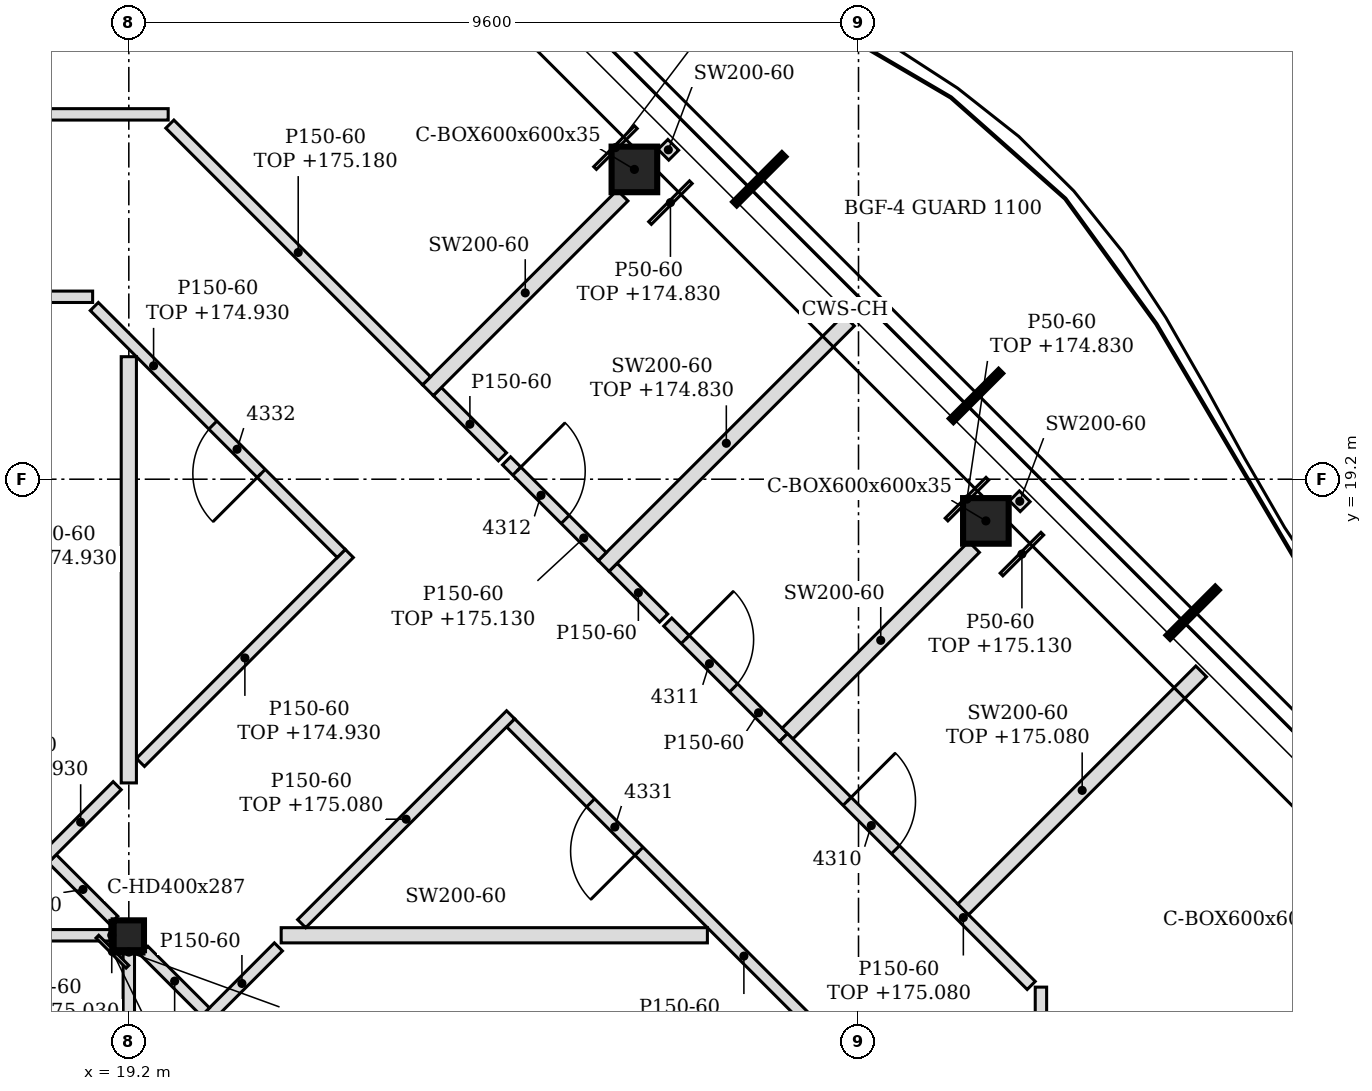
"""IFC4 building model, lengths in metres.
Left out: names, types, materials, properties, quantities, classifications, styles, units other than length and angle.
Written with IfcOpenShell. Run it as: python <this file> out.ifc"""

import sys

from ifc_helpers import new_model, si_unit, direction, frame, frame_2d, origin, origin_2d, place, context, subcontext, project, spatial, polyline, rectangle, hollow_rectangle, i_section, outline, extrude, clip, halfspace, element, fill, save


model = new_model("IFC4")
c1 = context("Model", 3, precision=1e-05, world=origin(), true_north=direction((0.0, 1.0)))
c2 = subcontext(c1, "Body", "Model", "MODEL_VIEW")
j1 = project(units=[si_unit("LENGTHUNIT", "METRE"), si_unit("PLANEANGLEUNIT", "RADIAN")], contexts=[c1])
p1 = place(None, origin())
s1 = spatial("IfcSite", under=j1, at=p1, CompositionType="ELEMENT")
p2 = place(p1, origin())
s2 = spatial("IfcBuilding", under=s1, at=p2, CompositionType="ELEMENT")
p3 = place(p2, frame((0.0, 0.0, 172.2)))
s3 = spatial("IfcBuildingStorey", under=s2, at=p3, CompositionType="ELEMENT", Elevation=172.2)
p4 = place(p3, frame((30.476, 18.652, -0.15), z_axis=(0.062353782033, -0.041591730966, 0.997187110718), x_axis=(0.554908399644, 0.831911454426, 0.0)))
e1 = element("IfcColumn", 1, at=p4, inside=s3, PredefinedType="COLUMN", context=c2, shape_type="Clipping", body=[
    clip(clip(extrude(hollow_rectangle(XDim=0.6, YDim=0.6, WallThickness=0.035, at=origin_2d()), origin(), (0.0, 0.0, 1.0), 3.61), halfspace(frame((0.0, 0.0, 0.011), z_axis=(0.0, 0.0, 1.0), x_axis=(1.0, 0.0, 0.0)), True)), halfspace(frame((0.0, 0.0, 3.588), z_axis=(0.0, 0.0, 1.0), x_axis=(1.0, 0.0, 0.0)), False)),
])
p5 = place(p3, frame((25.852, 23.276, -0.15), z_axis=(0.062286590776, -0.041524393851, 0.99719411617), x_axis=(0.554700196225, 0.832050294338, 0.0)))
e2 = element("IfcColumn", 2, at=p5, inside=s3, PredefinedType="COLUMN", context=c2, shape_type="Clipping", body=[
    clip(clip(extrude(hollow_rectangle(XDim=0.6, YDim=0.6, WallThickness=0.035, at=origin_2d()), origin(), (0.0, 0.0, 1.0), 3.61), halfspace(frame((0.0, 0.0, 0.011), z_axis=(0.0, 0.0, 1.0), x_axis=(1.0, 0.0, 0.0)), True)), halfspace(frame((0.0, 0.0, 3.588), z_axis=(0.0, 0.0, 1.0), x_axis=(1.0, 0.0, 0.0)), False)),
])
p6 = place(p3, frame((19.2, 13.2, -0.15), z_axis=(0.0, 0.0, 1.0), x_axis=(1.0, 0.0, 0.0)))
e3 = element("IfcColumn", 3, at=p6, inside=s3, PredefinedType="COLUMN", context=c2, shape_type="SweptSolid", body=[
    extrude(i_section(OverallWidth=0.399, OverallDepth=0.393, WebThickness=0.023, FlangeThickness=0.037, FilletRadius=0.015, at=origin_2d()), origin(), (0.0, 0.0, 1.0), 3.6),
])
p7 = place(p3, frame((19.2, 2.596, 0.0), z_axis=(0.0, 0.0, 1.0), x_axis=(0.0, 1.0, 0.0)))
e4 = element("IfcWall", 4, at=p7, inside=s3, PredefinedType="PARTITIONING", context=c2, shape_type="SweptSolid", body=[
    extrude(rectangle(XDim=10.407, YDim=0.15, at=frame_2d((5.204, 0.0))), origin(), (0.0, 0.0, 1.0), 2.83),
])
p8 = place(p7, frame((2.954, 0.0, 0.0)))
e5 = element("IfcOpeningElement", 5, at=p8, cuts=e4, PredefinedType="OPENING", context=c2, shape_type="SweptSolid", body=[
    extrude(rectangle(XDim=0.9, YDim=2.1, at=frame_2d((0.45, 1.05))), frame((0.0, 0.085, 0.0), z_axis=(0.0, -1.0, 0.0), x_axis=(1.0, 0.0, 0.0)), (0.0, 0.0, 1.0), 0.17),
])
p9 = place(p3, frame((31.2, 9.812, 0.0), z_axis=(0.0, 0.0, 1.0), x_axis=(0.0, 1.0, 0.0)))
e6 = element("IfcWall", 6, at=p9, inside=s3, PredefinedType="PARTITIONING", context=c2, shape_type="SweptSolid", body=[
    extrude(rectangle(XDim=2.706, YDim=0.15, at=frame_2d((1.353, 0.0))), origin(), (0.0, 0.0, 1.0), 2.93),
])
p10 = place(p9, frame((0.507, 0.0, 0.0)))
e7 = element("IfcOpeningElement", 7, at=p10, cuts=e6, PredefinedType="OPENING", context=c2, shape_type="SweptSolid", body=[
    extrude(rectangle(XDim=0.9, YDim=2.1, at=frame_2d((0.45, 1.05))), frame((0.0, 0.085, 0.0), z_axis=(0.0, -1.0, 0.0), x_axis=(1.0, 0.0, 0.0)), (0.0, 0.0, 1.0), 0.17),
])
p11 = place(p3, frame((28.672, 11.546, 0.0), z_axis=(0.0, 0.0, 1.0), x_axis=(-0.707106781187, 0.707106781187, 0.0)))
e8 = element("IfcWall", 8, at=p11, inside=s3, PredefinedType="PARTITIONING", context=c2, shape_type="SweptSolid", body=[
    extrude(rectangle(XDim=6.292, YDim=0.15, at=frame_2d((3.146, 0.0))), origin(), (0.0, 0.0, 1.0), 2.88),
])
p12 = place(p11, frame((3.903, 0.0, 0.0)))
e9 = element("IfcOpeningElement", 9, at=p12, cuts=e8, PredefinedType="OPENING", context=c2, shape_type="SweptSolid", body=[
    extrude(rectangle(XDim=0.9, YDim=2.1, at=frame_2d((0.45, 1.05))), frame((0.0, 0.085, 0.0), z_axis=(0.0, -1.0, 0.0), x_axis=(1.0, 0.0, 0.0)), (0.0, 0.0, 1.0), 0.17),
])
p13 = place(p3, frame((20.208, 12.086, 0.0), z_axis=(0.0, 0.0, 1.0), x_axis=(0.706747296365, 0.707466083343, 0.0)))
e10 = element("IfcWall", 10, at=p13, inside=s3, PredefinedType="PARTITIONING", context=c2, shape_type="SweptSolid", body=[
    extrude(rectangle(XDim=1.359, YDim=0.15, at=frame_2d((0.679, 0.0))), origin(), (0.0, 0.0, 1.0), 3.45),
])
p14 = place(p3, frame((20.208, 12.192, 0.0), z_axis=(0.0, 0.0, 1.0), x_axis=(-0.70721334539, 0.707000200921, 0.0)))
e11 = element("IfcWall", 11, at=p14, inside=s3, PredefinedType="PARTITIONING", context=c2, shape_type="SweptSolid", body=[
    extrude(rectangle(XDim=1.146, YDim=0.15, at=frame_2d((0.573, 0.0))), origin(), (0.0, 0.0, 1.0), 3.45),
])
p15 = place(p3, frame((31.072, 12.54, 0.0), z_axis=(0.0, 0.0, 1.0), x_axis=(-0.707106781187, 0.707106781187, 0.0)))
e12 = element("IfcWall", 12, at=p15, inside=s3, PredefinedType="PARTITIONING", context=c2, shape_type="SweptSolid", body=[
    extrude(rectangle(XDim=4.61, YDim=0.15, at=frame_2d((2.305, 0.0))), origin(), (0.0, 0.0, 1.0), 2.88),
])
p16 = place(p15, frame((2.525, 0.0, 0.0)))
e13 = element("IfcOpeningElement", 13, at=p16, cuts=e12, PredefinedType="OPENING", context=c2, shape_type="SweptSolid", body=[
    extrude(rectangle(XDim=0.9, YDim=2.1, at=frame_2d((0.45, 1.05))), frame((0.0, 0.085, 0.0), z_axis=(0.0, -1.0, 0.0), x_axis=(1.0, 0.0, 0.0)), (0.0, 0.0, 1.0), 0.17),
])
p17 = place(p3, frame((7.399, 13.2, 0.0), z_axis=(0.0, 0.0, 1.0), x_axis=(1.0, 0.0, 0.0)))
e14 = element("IfcWall", 14, at=p17, inside=s3, PredefinedType="PARTITIONING", context=c2, shape_type="SweptSolid", body=[
    extrude(rectangle(XDim=11.601, YDim=0.15, at=frame_2d((5.801, 0.0))), origin(), (0.0, 0.0, 1.0), 2.83),
])
p18 = place(p17, frame((5.351, 0.0, 0.0)))
e15 = element("IfcOpeningElement", 15, at=p18, cuts=e14, PredefinedType="OPENING", context=c2, shape_type="SweptSolid", body=[
    extrude(rectangle(XDim=0.9, YDim=2.1, at=frame_2d((0.45, 1.05))), frame((0.0, 0.085, 0.0), z_axis=(0.0, -1.0, 0.0), x_axis=(1.0, 0.0, 0.0)), (0.0, 0.0, 1.0), 0.17),
])
p19 = place(p3, frame((21.205, 13.2, 0.0), z_axis=(0.0, 0.0, 1.0), x_axis=(1.0, 0.0, 0.0)))
e16 = element("IfcWall", 16, at=p19, inside=s3, PredefinedType="PARTITIONING", context=c2, shape_type="SweptSolid", body=[
    extrude(rectangle(XDim=5.607, YDim=0.2, at=frame_2d((2.804, 0.0))), origin(), (0.0, 0.0, 1.0), 3.45),
])
p20 = place(p3, frame((19.002, 13.398, 0.0), z_axis=(0.0, 0.0, 1.0), x_axis=(-0.707000200921, 0.70721334539, 0.0)))
e17 = element("IfcWall", 17, at=p20, inside=s3, PredefinedType="PARTITIONING", context=c2, shape_type="SweptSolid", body=[
    extrude(rectangle(XDim=1.146, YDim=0.15, at=frame_2d((0.573, 0.0))), origin(), (0.0, 0.0, 1.0), 3.45),
])
p21 = place(p3, frame((21.474, 13.353, 0.0), z_axis=(0.0, 0.0, 1.0), x_axis=(0.707200993001, 0.707012556818, 0.0)))
e18 = element("IfcWall", 18, at=p21, inside=s3, PredefinedType="PARTITIONING", context=c2, shape_type="SweptSolid", body=[
    extrude(rectangle(XDim=3.887, YDim=0.15, at=frame_2d((1.943, 0.0))), origin(), (0.0, 0.0, 1.0), 2.88),
])
p22 = place(p3, frame((30.177, 13.541, 0.0), z_axis=(0.0, 0.0, 1.0), x_axis=(0.707106781187, 0.707106781187, 0.0)))
e19 = element("IfcWall", 19, at=p22, inside=s3, PredefinedType="PARTITIONING", context=c2, shape_type="SweptSolid", body=[
    extrude(rectangle(XDim=4.428, YDim=0.2, at=frame_2d((2.214, 0.0))), origin(), (0.0, 0.0, 1.0), 2.88),
])
p23 = place(p3, frame((18.086, 14.208, 0.0), z_axis=(0.0, 0.0, 1.0), x_axis=(0.707466083343, 0.706747296365, 0.0)))
e20 = element("IfcWall", 20, at=p23, inside=s3, PredefinedType="PARTITIONING", context=c2, shape_type="SweptSolid", body=[
    extrude(rectangle(XDim=1.359, YDim=0.15, at=frame_2d((0.679, 0.0))), origin(), (0.0, 0.0, 1.0), 2.73),
])
p24 = place(p3, frame((19.2, 15.205, 0.0), z_axis=(0.0, 0.0, 1.0), x_axis=(0.0, 1.0, 0.0)))
e21 = element("IfcWall", 21, at=p24, inside=s3, PredefinedType="PARTITIONING", context=c2, shape_type="SweptSolid", body=[
    extrude(rectangle(XDim=5.607, YDim=0.2, at=frame_2d((2.804, 0.0))), origin(), (0.0, 0.0, 1.0), 2.73),
])
p25 = place(p3, frame((19.353, 15.474, 0.0), z_axis=(0.0, 0.0, 1.0), x_axis=(0.707012556818, 0.707200993001, 0.0)))
e22 = element("IfcWall", 22, at=p25, inside=s3, PredefinedType="PARTITIONING", context=c2, shape_type="SweptSolid", body=[
    extrude(rectangle(XDim=3.887, YDim=0.15, at=frame_2d((1.943, 0.0))), origin(), (0.0, 0.0, 1.0), 2.73),
])
p26 = place(p3, frame((27.812, 15.8, 0.0), z_axis=(0.0, 0.0, 1.0), x_axis=(-0.707333708891, 0.706879780632, 0.0)))
e23 = element("IfcWall", 23, at=p26, inside=s3, PredefinedType="PARTITIONING", context=c2, shape_type="SweptSolid", body=[
    extrude(rectangle(XDim=2.151, YDim=0.15, at=frame_2d((1.076, 0.0))), origin(), (0.0, 0.0, 1.0), 3.45),
])
p27 = place(p26, frame((0.926, 0.0, 0.0)))
e24 = element("IfcOpeningElement", 24, at=p27, cuts=e23, PredefinedType="OPENING", context=c2, shape_type="SweptSolid", body=[
    extrude(rectangle(XDim=0.9, YDim=2.1, at=frame_2d((0.45, 1.05))), frame((0.0, 0.085, 0.0), z_axis=(0.0, -1.0, 0.0), x_axis=(1.0, 0.0, 0.0)), (0.0, 0.0, 1.0), 0.17),
])
p28 = place(p3, frame((27.865, 15.853, 0.0), z_axis=(0.0, 0.0, 1.0), x_axis=(0.707106781187, 0.707106781187, 0.0)))
e25 = element("IfcWall", 25, at=p28, inside=s3, PredefinedType="PARTITIONING", context=c2, shape_type="SweptSolid", body=[
    extrude(rectangle(XDim=3.472, YDim=0.2, at=frame_2d((1.736, 0.0))), origin(), (0.0, 0.0, 1.0), 3.45),
])
p29 = place(p3, frame((26.237, 17.373, 0.0), z_axis=(0.0, 0.0, 1.0), x_axis=(-0.706200152123, 0.708012249288, 0.0)))
e26 = element("IfcWall", 26, at=p29, inside=s3, PredefinedType="PARTITIONING", context=c2, shape_type="SweptSolid", body=[
    extrude(rectangle(XDim=0.943, YDim=0.15, at=frame_2d((0.472, 0.0))), origin(), (0.0, 0.0, 1.0), 3.45),
])
p30 = place(p3, frame((25.447, 18.059, 0.0), z_axis=(0.0, 0.0, 1.0), x_axis=(0.707106781187, 0.707106781187, 0.0)))
e27 = element("IfcWall", 27, at=p30, inside=s3, PredefinedType="PARTITIONING", context=c2, shape_type="SweptSolid", body=[
    extrude(rectangle(XDim=4.565, YDim=0.2, at=frame_2d((2.282, 0.0))), origin(), (0.0, 0.0, 1.0), 2.63),
])
p31 = place(p3, frame((21.995, 18.223, 0.0), z_axis=(0.0, 0.0, 1.0), x_axis=(-0.707106781187, 0.707106781187, 0.0)))
e28 = element("IfcWall", 28, at=p31, inside=s3, PredefinedType="PARTITIONING", context=c2, shape_type="SweptSolid", body=[
    extrude(rectangle(XDim=4.595, YDim=0.15, at=frame_2d((2.297, 0.0))), origin(), (0.0, 0.0, 1.0), 2.73),
])
p32 = place(p31, frame((1.489, 0.0, 0.0)))
e29 = element("IfcOpeningElement", 29, at=p32, cuts=e28, PredefinedType="OPENING", context=c2, shape_type="SweptSolid", body=[
    extrude(rectangle(XDim=0.9, YDim=2.1, at=frame_2d((0.45, 1.05))), frame((0.0, 0.085, 0.0), z_axis=(0.0, -1.0, 0.0), x_axis=(1.0, 0.0, 0.0)), (0.0, 0.0, 1.0), 0.17),
])
p33 = place(p3, frame((25.429, 18.183, 0.0), z_axis=(0.0, 0.0, 1.0), x_axis=(-0.707243830661, 0.706969705145, 0.0)))
e30 = element("IfcWall", 30, at=p33, inside=s3, PredefinedType="PARTITIONING", context=c2, shape_type="SweptSolid", body=[
    extrude(rectangle(XDim=1.781, YDim=0.15, at=frame_2d((0.891, 0.0))), origin(), (0.0, 0.0, 1.0), 2.93),
])
p34 = place(p33, frame((0.69, 0.0, 0.0)))
e31 = element("IfcOpeningElement", 31, at=p34, cuts=e30, PredefinedType="OPENING", context=c2, shape_type="SweptSolid", body=[
    extrude(rectangle(XDim=0.9, YDim=2.1, at=frame_2d((0.45, 1.05))), frame((0.0, 0.085, 0.0), z_axis=(0.0, -1.0, 0.0), x_axis=(1.0, 0.0, 0.0)), (0.0, 0.0, 1.0), 0.17),
])
p35 = place(p3, frame((30.857, 18.845, 0.0), z_axis=(0.0, 0.0, 1.0), x_axis=(0.707106781187, 0.707106781187, 0.0)))
e32 = element("IfcWall", 32, at=p35, inside=s3, PredefinedType="PARTITIONING", context=c2, shape_type="SweptSolid", body=[
    extrude(rectangle(XDim=0.184, YDim=0.2, at=frame_2d((0.092, 0.0))), origin(), (0.0, 0.0, 1.0), 3.45),
])
p36 = place(p3, frame((24.116, 19.494, 0.0), z_axis=(0.0, 0.0, 1.0), x_axis=(-0.706402241469, 0.707810619621, 0.0)))
e33 = element("IfcWall", 33, at=p36, inside=s3, PredefinedType="PARTITIONING", context=c2, shape_type="SweptSolid", body=[
    extrude(rectangle(XDim=1.213, YDim=0.15, at=frame_2d((0.607, 0.0))), origin(), (0.0, 0.0, 1.0), 3.45),
])
p37 = place(p3, frame((23.135, 20.371, 0.0), z_axis=(0.0, 0.0, 1.0), x_axis=(0.707106781187, 0.707106781187, 0.0)))
e34 = element("IfcWall", 34, at=p37, inside=s3, PredefinedType="PARTITIONING", context=c2, shape_type="SweptSolid", body=[
    extrude(rectangle(XDim=3.622, YDim=0.2, at=frame_2d((1.811, 0.0))), origin(), (0.0, 0.0, 1.0), 3.45),
])
p38 = place(p3, frame((23.117, 20.495, 0.0), z_axis=(0.0, 0.0, 1.0), x_axis=(-0.707081222956, 0.707132338493, 0.0)))
e35 = element("IfcWall", 35, at=p38, inside=s3, PredefinedType="PARTITIONING", context=c2, shape_type="SweptSolid", body=[
    extrude(rectangle(XDim=4.776, YDim=0.15, at=frame_2d((2.388, 0.0))), origin(), (0.0, 0.0, 1.0), 2.98),
])
p39 = place(p3, frame((7.125, 21.6, 0.0), z_axis=(0.0, 0.0, 1.0), x_axis=(1.0, 0.0, 0.0)))
e36 = element("IfcWall", 36, at=p39, inside=s3, PredefinedType="PARTITIONING", context=c2, shape_type="SweptSolid", body=[
    extrude(outline(polyline([(0.0, 0.0), (11.599, 0.0), (11.599, 3.45), (0.225, 3.45), (0.223, 2.73), (0.0, 2.73), (0.0, 0.0)])), frame((0.0, 0.075, 0.0), z_axis=(0.0, -1.0, 0.0), x_axis=(1.0, 0.0, 0.0)), (0.0, 0.0, 1.0), 0.15),
])
p40 = place(p3, frame((26.233, 23.469, 0.0), z_axis=(0.0, 0.0, 1.0), x_axis=(0.706442519737, 0.70777041921, 0.0)))
e37 = element("IfcWall", 37, at=p40, inside=s3, PredefinedType="PARTITIONING", context=c2, shape_type="SweptSolid", body=[
    extrude(rectangle(XDim=0.184, YDim=0.2, at=frame_2d((0.092, 0.0))), origin(), (0.0, 0.0, 1.0), 3.45),
])
p41 = place(p3, frame((-5.318, 24.0, 0.0), z_axis=(0.0, 0.0, 1.0), x_axis=(1.0, 0.0, 0.0)))
e38 = element("IfcWall", 38, at=p41, inside=s3, PredefinedType="PARTITIONING", context=c2, shape_type="SweptSolid", body=[
    extrude(outline(polyline([(0.0, 0.0), (25.036, 0.0), (25.036, 3.45), (24.668, 3.45), (24.666, 2.73), (24.368, 2.73), (24.366, 2.88), (12.668, 2.88), (12.666, 2.73), (12.368, 2.73), (12.366, 2.88), (0.668, 2.88), (0.666, 2.73), (0.368, 2.73), (0.366, 3.45), (0.0, 3.45), (0.0, 0.0)])), frame((0.0, 0.075, 0.0), z_axis=(0.0, -1.0, 0.0), x_axis=(1.0, 0.0, 0.0)), (0.0, 0.0, 1.0), 0.15),
])
p42 = place(p41, frame((21.868, 0.0, 0.0)))
e39 = element("IfcOpeningElement", 39, at=p42, cuts=e38, PredefinedType="OPENING", context=c2, shape_type="SweptSolid", body=[
    extrude(rectangle(XDim=0.9, YDim=2.1, at=frame_2d((0.45, 1.05))), frame((0.0, 0.085, 0.0), z_axis=(0.0, -1.0, 0.0), x_axis=(1.0, 0.0, 0.0)), (0.0, 0.0, 1.0), 0.17),
])
p43 = place(p41, frame((12.181, 0.0, 0.0)))
e40 = element("IfcOpeningElement", 40, at=p43, cuts=e38, PredefinedType="OPENING", context=c2, shape_type="SweptSolid", body=[
    extrude(rectangle(XDim=0.9, YDim=2.1, at=frame_2d((0.45, 1.05))), frame((0.0, 0.085, 0.0), z_axis=(0.0, -1.0, 0.0), x_axis=(1.0, 0.0, 0.0)), (0.0, 0.0, 1.0), 0.17),
])
p44 = place(p41, frame((4.78, 0.0, 0.0)))
e41 = element("IfcOpeningElement", 41, at=p44, cuts=e38, PredefinedType="OPENING", context=c2, shape_type="SweptSolid", body=[
    extrude(rectangle(XDim=0.9, YDim=2.1, at=frame_2d((0.45, 1.05))), frame((0.0, 0.085, 0.0), z_axis=(0.0, -1.0, 0.0), x_axis=(1.0, 0.0, 0.0)), (0.0, 0.0, 1.0), 0.17),
])
p45 = place(p3, frame((18.976, 13.003, 0.0), z_axis=(0.0, 0.0, 1.0), x_axis=(0.0, 1.0, 0.0)))
e42 = element("IfcWall", 42, at=p45, inside=s3, PredefinedType="PARTITIONING", context=c2, shape_type="SweptSolid", body=[
    extrude(rectangle(XDim=0.393, YDim=0.05, at=frame_2d((0.197, 0.0))), origin(), (0.0, 0.0, 1.0), 2.83),
])
p46 = place(p3, frame((19.182, 12.786, 0.0), z_axis=(0.0, 0.0, 1.0), x_axis=(-0.707106781187, 0.707106781187, 0.0)))
e43 = element("IfcWall", 43, at=p46, inside=s3, PredefinedType="PARTITIONING", context=c2, shape_type="SweptSolid", body=[
    extrude(rectangle(XDim=0.56, YDim=0.05, at=frame_2d((0.28, 0.0))), origin(), (0.0, 0.0, 1.0), 2.83),
])
p47 = place(p3, frame((19.0, 12.979, 0.0), z_axis=(0.0, 0.0, 1.0), x_axis=(1.0, 0.0, 0.0)))
e44 = element("IfcWall", 44, at=p47, inside=s3, PredefinedType="PARTITIONING", context=c2, shape_type="SweptSolid", body=[
    extrude(rectangle(XDim=0.399, YDim=0.05, at=frame_2d((0.199, 0.0))), origin(), (0.0, 0.0, 1.0), 2.83),
])
p48 = place(p3, frame((29.958, 18.67, 0.0), z_axis=(0.0, 0.0, 1.0), x_axis=(0.707267505531, 0.706946020301, 0.0)))
e45 = element("IfcWall", 45, at=p48, inside=s3, PredefinedType="PARTITIONING", context=c2, shape_type="SweptSolid", body=[
    extrude(rectangle(XDim=0.76, YDim=0.05, at=frame_2d((0.38, 0.0))), origin(), (0.0, 0.0, 1.0), 2.63),
])
for number, where, z_axis, x_axis in (
    (46, (30.681, 17.946, 0.0), (0.0, 0.0, 1.0), (0.707, 0.707, 0.0)),
    (47, (25.334, 23.294, 0.0), (0.0, 0.0, 1.0), (0.707, 0.707, 0.0)),
):
    element("IfcWall", number, at=place(p3, frame(where, z_axis=z_axis, x_axis=x_axis)), inside=s3, PredefinedType="PARTITIONING", context=c2, shape_type="SweptSolid", body=[
        extrude(rectangle(XDim=0.76, YDim=0.05, at=frame_2d((0.38, 0.0))), origin(), (0.0, 0.0, 1.0), 2.93),
    ])
p49 = place(p3, frame((26.057, 22.571, 0.0), z_axis=(0.0, 0.0, 1.0), x_axis=(0.706946020301, 0.707267505531, 0.0)))
e48 = element("IfcWall", 48, at=p49, inside=s3, PredefinedType="PARTITIONING", context=c2, shape_type="SweptSolid", body=[
    extrude(rectangle(XDim=0.76, YDim=0.05, at=frame_2d((0.38, 0.0))), origin(), (0.0, 0.0, 1.0), 2.63),
])
p50 = place(p16, frame((0.9, 0.0, 0.0), z_axis=(0.0, 0.0, 1.0), x_axis=(-1.0, 0.0, 0.0)))
e49 = element("IfcDoor", 49, at=p50, inside=s3, OperationType="SINGLE_SWING_LEFT", PredefinedType="DOOR", context=c2, shape_type="SweptSolid", body=[
    extrude(rectangle(XDim=0.9, YDim=2.1, at=frame_2d((0.45, 1.05))), frame((0.0, 0.025, 0.0), z_axis=(0.0, -1.0, 0.0), x_axis=(1.0, 0.0, 0.0)), (0.0, 0.0, 1.0), 0.05),
])
fill(e13, e49)
p51 = place(p27, frame((0.9, 0.0, 0.0), z_axis=(0.0, 0.0, 1.0), x_axis=(-1.0, 0.0, 0.0)))
e50 = element("IfcDoor", 50, at=p51, inside=s3, OperationType="SINGLE_SWING_LEFT", PredefinedType="DOOR", context=c2, shape_type="SweptSolid", body=[
    extrude(rectangle(XDim=0.9, YDim=2.1, at=frame_2d((0.45, 1.05))), frame((0.0, 0.025, 0.0), z_axis=(0.0, -1.0, 0.0), x_axis=(1.0, 0.0, 0.0)), (0.0, 0.0, 1.0), 0.05),
])
fill(e24, e50)
p52 = place(p34, frame((0.9, 0.0, 0.0), z_axis=(0.0, 0.0, 1.0), x_axis=(-1.0, 0.0, 0.0)))
e51 = element("IfcDoor", 51, at=p52, inside=s3, OperationType="SINGLE_SWING_LEFT", PredefinedType="DOOR", context=c2, shape_type="SweptSolid", body=[
    extrude(rectangle(XDim=0.9, YDim=2.1, at=frame_2d((0.45, 1.05))), frame((0.0, 0.025, 0.0), z_axis=(0.0, -1.0, 0.0), x_axis=(1.0, 0.0, 0.0)), (0.0, 0.0, 1.0), 0.05),
])
fill(e31, e51)
p53 = place(p12, origin())
e52 = element("IfcDoor", 52, at=p53, inside=s3, OperationType="SINGLE_SWING_LEFT", PredefinedType="DOOR", context=c2, shape_type="SweptSolid", body=[
    extrude(rectangle(XDim=0.9, YDim=2.1, at=frame_2d((0.45, 1.05))), frame((0.0, 0.025, 0.0), z_axis=(0.0, -1.0, 0.0), x_axis=(1.0, 0.0, 0.0)), (0.0, 0.0, 1.0), 0.05),
])
fill(e9, e52)
p54 = place(p32, origin())
e53 = element("IfcDoor", 53, at=p54, inside=s3, OperationType="SINGLE_SWING_LEFT", PredefinedType="DOOR", context=c2, shape_type="SweptSolid", body=[
    extrude(rectangle(XDim=0.9, YDim=2.1, at=frame_2d((0.45, 1.05))), frame((0.0, 0.025, 0.0), z_axis=(0.0, -1.0, 0.0), x_axis=(1.0, 0.0, 0.0)), (0.0, 0.0, 1.0), 0.05),
])
fill(e29, e53)
save(model, sys.argv[1])
